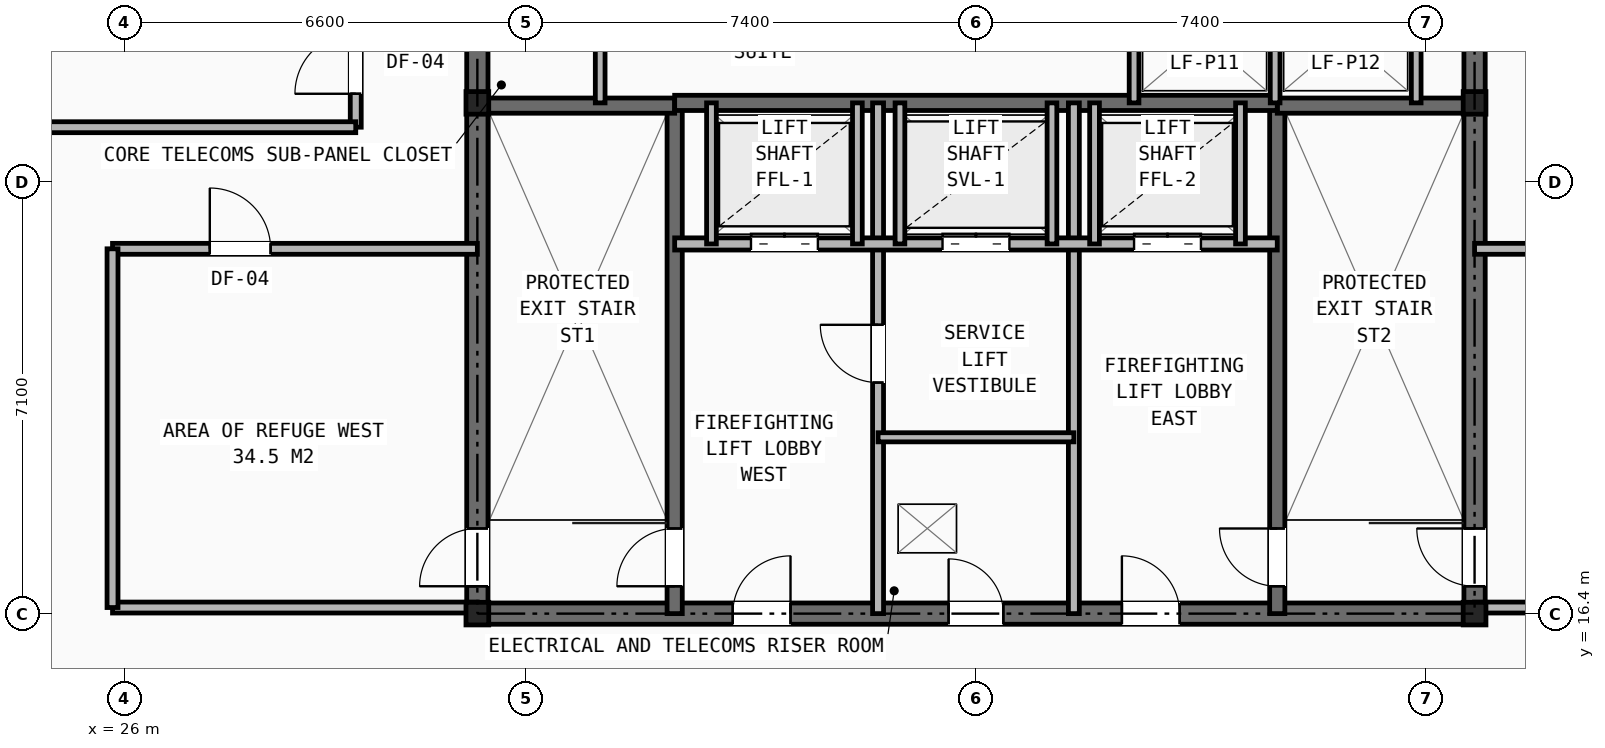
"""IFC4 building model, lengths in metres.
Left out: names, types, materials, properties, quantities, classifications, styles, units other than length and angle.
Written with IfcOpenShell. Run it as: python <this file> out.ifc"""

import sys

from ifc_helpers import new_model, si_unit, direction, frame, frame_2d, origin, origin_2d, place, context, subcontext, project, spatial, rectangle, i_section, extrude, element, fill, save


model = new_model("IFC4")
c1 = context("Model", 3, precision=1e-05, world=origin(), true_north=direction((0.0, 1.0)))
c2 = subcontext(c1, "Body", "Model", "MODEL_VIEW")
j1 = project(units=[si_unit("LENGTHUNIT", "METRE"), si_unit("PLANEANGLEUNIT", "RADIAN")], contexts=[c1])
p1 = place(None, origin())
s1 = spatial("IfcSite", under=j1, at=p1, CompositionType="ELEMENT")
p2 = place(p1, origin())
s2 = spatial("IfcBuilding", under=s1, at=p2, CompositionType="ELEMENT")
p3 = place(p2, frame((0.0, 0.0, 290.0)))
s3 = spatial("IfcBuildingStorey", under=s2, at=p3, CompositionType="ELEMENT", Elevation=290.0)
for number, where, z_axis, x_axis in (
    (1, (31.8, 16.4, 0.0), (0.0, 0.0, 1.0), (1.0, 0.0, 0.0)),
    (2, (48.2, 16.4, 0.0), (0.0, 0.0, 1.0), (1.0, 0.0, 0.0)),
    (3, (31.8, 24.8, 0.0), (0.0, 0.0, 1.0), (1.0, 0.0, 0.0)),
    (4, (48.2, 24.8, 0.0), (0.0, 0.0, 1.0), (1.0, 0.0, 0.0)),
):
    element("IfcColumn", number, at=place(p3, frame(where, z_axis=z_axis, x_axis=x_axis)), inside=s3, PredefinedType="COLUMN", context=c2, shape_type="SweptSolid", body=[
        extrude(i_section(OverallWidth=0.374, OverallDepth=0.372, WebThickness=0.016, FlangeThickness=0.026, at=origin_2d()), origin(), (0.0, 0.0, 1.0), 4.8),
    ])
p4 = place(p3, frame((31.8, 16.4, 0.0), z_axis=(0.0, 0.0, 1.0), x_axis=(1.0, 0.0, 0.0)))
e5 = element("IfcWall", 5, at=p4, inside=s3, PredefinedType="SHEAR", context=c2, shape_type="SweptSolid", body=[
    extrude(rectangle(XDim=16.4, YDim=0.35, at=frame_2d((8.2, 0.0))), origin(), (0.0, 0.0, 1.0), 4.54),
])
p5 = place(p4, frame((7.75, 0.0, 0.0)))
e6 = element("IfcOpeningElement", 6, at=p5, cuts=e5, PredefinedType="OPENING", context=c2, shape_type="SweptSolid", body=[
    extrude(rectangle(XDim=0.9, YDim=2.1, at=frame_2d((0.45, 1.05))), frame((0.0, 0.185, 0.0), z_axis=(0.0, -1.0, 0.0), x_axis=(1.0, 0.0, 0.0)), (0.0, 0.0, 1.0), 0.37),
])
p6 = place(p4, frame((4.2, 0.0, 0.0)))
e7 = element("IfcOpeningElement", 7, at=p6, cuts=e5, PredefinedType="OPENING", context=c2, shape_type="SweptSolid", body=[
    extrude(rectangle(XDim=0.95, YDim=2.1, at=frame_2d((0.475, 1.05))), frame((0.0, 0.185, 0.0), z_axis=(0.0, -1.0, 0.0), x_axis=(1.0, 0.0, 0.0)), (0.0, 0.0, 1.0), 0.37),
])
p7 = place(p4, frame((10.6, 0.0, 0.0)))
e8 = element("IfcOpeningElement", 8, at=p7, cuts=e5, PredefinedType="OPENING", context=c2, shape_type="SweptSolid", body=[
    extrude(rectangle(XDim=0.95, YDim=2.1, at=frame_2d((0.475, 1.05))), frame((0.0, 0.185, 0.0), z_axis=(0.0, -1.0, 0.0), x_axis=(1.0, 0.0, 0.0)), (0.0, 0.0, 1.0), 0.37),
])
p8 = place(p3, frame((31.8, 16.4, 0.0), z_axis=(0.0, 0.0, 1.0), x_axis=(0.0, 1.0, 0.0)))
e9 = element("IfcWall", 9, at=p8, inside=s3, PredefinedType="SHEAR", context=c2, shape_type="SweptSolid", body=[
    extrude(rectangle(XDim=14.8, YDim=0.35, at=frame_2d((7.4, 0.0))), origin(), (0.0, 0.0, 1.0), 4.54),
])
p9 = place(p8, frame((11.0, 0.0, 0.0)))
e10 = element("IfcOpeningElement", 10, at=p9, cuts=e9, PredefinedType="OPENING", context=c2, shape_type="SweptSolid", body=[
    extrude(rectangle(XDim=1.1, YDim=2.15, at=frame_2d((0.55, 1.075))), frame((0.0, 0.185, 0.0), z_axis=(0.0, -1.0, 0.0), x_axis=(1.0, 0.0, 0.0)), (0.0, 0.0, 1.0), 0.37),
])
p10 = place(p8, frame((0.45, 0.0, 0.0)))
e11 = element("IfcOpeningElement", 11, at=p10, cuts=e9, PredefinedType="OPENING", context=c2, shape_type="SweptSolid", body=[
    extrude(rectangle(XDim=0.95, YDim=2.1, at=frame_2d((0.475, 1.05))), frame((0.0, 0.185, 0.0), z_axis=(0.0, -1.0, 0.0), x_axis=(1.0, 0.0, 0.0)), (0.0, 0.0, 1.0), 0.37),
])
p11 = place(p3, frame((48.2, 16.4, 0.0), z_axis=(0.0, 0.0, 1.0), x_axis=(0.0, 1.0, 0.0)))
e12 = element("IfcWall", 12, at=p11, inside=s3, PredefinedType="SHEAR", context=c2, shape_type="SweptSolid", body=[
    extrude(rectangle(XDim=14.8, YDim=0.35, at=frame_2d((7.4, 0.0))), origin(), (0.0, 0.0, 1.0), 4.54),
])
p12 = place(p11, frame((11.0, 0.0, 0.0)))
e13 = element("IfcOpeningElement", 13, at=p12, cuts=e12, PredefinedType="OPENING", context=c2, shape_type="SweptSolid", body=[
    extrude(rectangle(XDim=1.1, YDim=2.15, at=frame_2d((0.55, 1.075))), frame((0.0, 0.185, 0.0), z_axis=(0.0, -1.0, 0.0), x_axis=(1.0, 0.0, 0.0)), (0.0, 0.0, 1.0), 0.37),
])
p13 = place(p11, frame((0.45, 0.0, 0.0)))
e14 = element("IfcOpeningElement", 14, at=p13, cuts=e12, PredefinedType="OPENING", context=c2, shape_type="SweptSolid", body=[
    extrude(rectangle(XDim=0.95, YDim=2.1, at=frame_2d((0.475, 1.05))), frame((0.0, 0.185, 0.0), z_axis=(0.0, -1.0, 0.0), x_axis=(1.0, 0.0, 0.0)), (0.0, 0.0, 1.0), 0.37),
])
p14 = place(p3, frame((35.045, 16.4, 0.0), z_axis=(0.0, 0.0, 1.0), x_axis=(0.0, 1.0, 0.0)))
e15 = element("IfcWall", 15, at=p14, inside=s3, PredefinedType="SHEAR", context=c2, shape_type="SweptSolid", body=[
    extrude(rectangle(XDim=8.4, YDim=0.25, at=frame_2d((4.2, 0.0))), origin(), (0.0, 0.0, 1.0), 4.54),
])
p15 = place(p14, frame((0.45, 0.0, 0.0)))
e16 = element("IfcOpeningElement", 16, at=p15, cuts=e15, PredefinedType="OPENING", context=c2, shape_type="SweptSolid", body=[
    extrude(rectangle(XDim=0.95, YDim=2.1, at=frame_2d((0.475, 1.05))), frame((0.0, 0.135, 0.0), z_axis=(0.0, -1.0, 0.0), x_axis=(1.0, 0.0, 0.0)), (0.0, 0.0, 1.0), 0.27),
])
p16 = place(p3, frame((31.8, 24.755, 0.0), z_axis=(0.0, 0.0, 1.0), x_axis=(1.0, 0.0, 0.0)))
e17 = element("IfcWall", 17, at=p16, inside=s3, PredefinedType="SHEAR", context=c2, shape_type="SweptSolid", body=[
    extrude(rectangle(XDim=3.245, YDim=0.25, at=frame_2d((1.623, 0.0))), origin(), (0.0, 0.0, 1.0), 4.54),
])
p17 = place(p3, frame((44.955, 16.4, 0.0), z_axis=(0.0, 0.0, 1.0), x_axis=(0.0, 1.0, 0.0)))
e18 = element("IfcWall", 18, at=p17, inside=s3, PredefinedType="SHEAR", context=c2, shape_type="SweptSolid", body=[
    extrude(rectangle(XDim=8.4, YDim=0.25, at=frame_2d((4.2, 0.0))), origin(), (0.0, 0.0, 1.0), 4.54),
])
p18 = place(p17, frame((0.45, 0.0, 0.0)))
e19 = element("IfcOpeningElement", 19, at=p18, cuts=e18, PredefinedType="OPENING", context=c2, shape_type="SweptSolid", body=[
    extrude(rectangle(XDim=0.95, YDim=2.1, at=frame_2d((0.475, 1.05))), frame((0.0, 0.135, 0.0), z_axis=(0.0, -1.0, 0.0), x_axis=(1.0, 0.0, 0.0)), (0.0, 0.0, 1.0), 0.27),
])
p19 = place(p3, frame((44.955, 24.755, 0.0), z_axis=(0.0, 0.0, 1.0), x_axis=(1.0, 0.0, 0.0)))
e20 = element("IfcWall", 20, at=p19, inside=s3, PredefinedType="SHEAR", context=c2, shape_type="SweptSolid", body=[
    extrude(rectangle(XDim=3.245, YDim=0.25, at=frame_2d((1.623, 0.0))), origin(), (0.0, 0.0, 1.0), 4.54),
])
p20 = place(p3, frame((35.045, 24.8, 0.0), z_axis=(0.0, 0.0, 1.0), x_axis=(1.0, 0.0, 0.0)))
e21 = element("IfcWall", 21, at=p20, inside=s3, PredefinedType="SHEAR", context=c2, shape_type="SweptSolid", body=[
    extrude(rectangle(XDim=9.91, YDim=0.25, at=frame_2d((4.955, 0.0))), origin(), (0.0, 0.0, 1.0), 4.54),
])
p21 = place(p3, frame((38.39, 16.4, 0.0), z_axis=(0.0, 0.0, 1.0), x_axis=(0.0, 1.0, 0.0)))
e22 = element("IfcWall", 22, at=p21, inside=s3, PredefinedType="PARTITIONING", context=c2, shape_type="SweptSolid", body=[
    extrude(rectangle(XDim=8.4, YDim=0.18, at=frame_2d((4.2, 0.0))), origin(), (0.0, 0.0, 1.0), 3.995),
])
p22 = place(p21, frame((3.8, 0.0, 0.0)))
e23 = element("IfcOpeningElement", 23, at=p22, cuts=e22, PredefinedType="OPENING", context=c2, shape_type="SweptSolid", body=[
    extrude(rectangle(XDim=0.95, YDim=2.1, at=frame_2d((0.475, 1.05))), frame((0.0, 0.1, 0.0), z_axis=(0.0, -1.0, 0.0), x_axis=(1.0, 0.0, 0.0)), (0.0, 0.0, 1.0), 0.2),
])
p23 = place(p3, frame((41.61, 16.4, 0.0), z_axis=(0.0, 0.0, 1.0), x_axis=(0.0, 1.0, 0.0)))
e24 = element("IfcWall", 24, at=p23, inside=s3, PredefinedType="PARTITIONING", context=c2, shape_type="SweptSolid", body=[
    extrude(rectangle(XDim=8.4, YDim=0.18, at=frame_2d((4.2, 0.0))), origin(), (0.0, 0.0, 1.0), 3.995),
])
p24 = place(p3, frame((35.045, 22.48, 0.0), z_axis=(0.0, 0.0, 1.0), x_axis=(1.0, 0.0, 0.0)))
e25 = element("IfcWall", 25, at=p24, inside=s3, PredefinedType="SOLIDWALL", context=c2, shape_type="SweptSolid", body=[
    extrude(rectangle(XDim=9.91, YDim=0.2, at=frame_2d((4.955, 0.0))), origin(), (0.0, 0.0, 1.0), 4.54),
])
p25 = place(p24, frame((1.255, 0.0, 0.0)))
e26 = element("IfcOpeningElement", 26, at=p25, cuts=e25, PredefinedType="OPENING", context=c2, shape_type="SweptSolid", body=[
    extrude(rectangle(XDim=1.1, YDim=2.15, at=frame_2d((0.55, 1.075))), frame((0.0, 0.11, 0.0), z_axis=(0.0, -1.0, 0.0), x_axis=(1.0, 0.0, 0.0)), (0.0, 0.0, 1.0), 0.22),
])
p26 = place(p24, frame((7.555, 0.0, 0.0)))
e27 = element("IfcOpeningElement", 27, at=p26, cuts=e25, PredefinedType="OPENING", context=c2, shape_type="SweptSolid", body=[
    extrude(rectangle(XDim=1.1, YDim=2.15, at=frame_2d((0.55, 1.075))), frame((0.0, 0.11, 0.0), z_axis=(0.0, -1.0, 0.0), x_axis=(1.0, 0.0, 0.0)), (0.0, 0.0, 1.0), 0.22),
])
p27 = place(p24, frame((4.405, 0.0, 0.0)))
e28 = element("IfcOpeningElement", 28, at=p27, cuts=e25, PredefinedType="OPENING", context=c2, shape_type="SweptSolid", body=[
    extrude(rectangle(XDim=1.1, YDim=2.15, at=frame_2d((0.55, 1.075))), frame((0.0, 0.11, 0.0), z_axis=(0.0, -1.0, 0.0), x_axis=(1.0, 0.0, 0.0)), (0.0, 0.0, 1.0), 0.22),
])
p28 = place(p3, frame((38.39, 19.3, 0.0), z_axis=(0.0, 0.0, 1.0), x_axis=(1.0, 0.0, 0.0)))
e29 = element("IfcWall", 29, at=p28, inside=s3, PredefinedType="PARTITIONING", context=c2, shape_type="SweptSolid", body=[
    extrude(rectangle(XDim=3.22, YDim=0.15, at=frame_2d((1.61, 0.0))), origin(), (0.0, 0.0, 1.0), 4.54),
])
for number, where, z_axis, x_axis in (
    (30, (35.65, 22.48, 0.0), (0.0, 0.0, 1.0), (0.0, 1.0, 0.0)),
    (31, (38.05, 22.48, 0.0), (0.0, 0.0, 1.0), (0.0, 1.0, 0.0)),
    (32, (41.95, 22.48, 0.0), (0.0, 0.0, 1.0), (0.0, 1.0, 0.0)),
    (33, (44.35, 22.48, 0.0), (0.0, 0.0, 1.0), (0.0, 1.0, 0.0)),
    (34, (38.75, 22.48, 0.0), (0.0, 0.0, 1.0), (0.0, 1.0, 0.0)),
    (35, (41.25, 22.48, 0.0), (0.0, 0.0, 1.0), (0.0, 1.0, 0.0)),
):
    element("IfcWall", number, at=place(p3, frame(where, z_axis=z_axis, x_axis=x_axis)), inside=s3, PredefinedType="SOLIDWALL", context=c2, shape_type="SweptSolid", body=[
        extrude(rectangle(XDim=2.32, YDim=0.16, at=frame_2d((1.16, 0.0))), origin(), (0.0, 0.0, 1.0), 4.54),
    ])
for number, where, z_axis, x_axis in (
    (36, (33.82, 24.8, 0.0), (0.0, 0.0, 1.0), (0.0, 1.0, 0.0)),
    (37, (42.6, 24.8, 0.0), (0.0, 0.0, 1.0), (0.0, 1.0, 0.0)),
    (38, (44.92, 24.8, 0.0), (0.0, 0.0, 1.0), (0.0, 1.0, 0.0)),
    (39, (47.24, 24.8, 0.0), (0.0, 0.0, 1.0), (0.0, 1.0, 0.0)),
):
    element("IfcWall", number, at=place(p3, frame(where, z_axis=z_axis, x_axis=x_axis)), inside=s3, PredefinedType="SOLIDWALL", context=c2, shape_type="SweptSolid", body=[
        extrude(rectangle(XDim=2.08, YDim=0.16, at=frame_2d((1.04, 0.0))), origin(), (0.0, 0.0, 1.0), 4.54),
    ])
p29 = place(p3, frame((29.8, 24.4, 0.0), z_axis=(0.0, 0.0, 1.0), x_axis=(0.0, 1.0, 0.0)))
e40 = element("IfcWall", 40, at=p29, inside=s3, PredefinedType="PARTITIONING", context=c2, shape_type="SweptSolid", body=[
    extrude(rectangle(XDim=8.6, YDim=0.18, at=frame_2d((4.3, 0.0))), origin(), (0.0, 0.0, 1.0), 3.582),
])
p30 = place(p29, frame((0.55, 0.0, 0.0)))
e41 = element("IfcOpeningElement", 41, at=p30, cuts=e40, PredefinedType="OPENING", context=c2, shape_type="SweptSolid", body=[
    extrude(rectangle(XDim=1.0, YDim=2.15, at=frame_2d((0.5, 1.075))), frame((0.0, 0.1, 0.0), z_axis=(0.0, -1.0, 0.0), x_axis=(1.0, 0.0, 0.0)), (0.0, 0.0, 1.0), 0.2),
])
p31 = place(p3, frame((25.8, 16.5, 0.0), z_axis=(0.0, 0.0, 1.0), x_axis=(1.0, 0.0, 0.0)))
e42 = element("IfcWall", 42, at=p31, inside=s3, PredefinedType="PARTITIONING", context=c2, shape_type="SweptSolid", body=[
    extrude(rectangle(XDim=6.0, YDim=0.18, at=frame_2d((3.0, 0.0))), origin(), (0.0, 0.0, 1.0), 3.582),
])
p32 = place(p3, frame((25.8, 22.4, 0.0), z_axis=(0.0, 0.0, 1.0), x_axis=(1.0, 0.0, 0.0)))
e43 = element("IfcWall", 43, at=p32, inside=s3, PredefinedType="PARTITIONING", context=c2, shape_type="SweptSolid", body=[
    extrude(rectangle(XDim=6.0, YDim=0.18, at=frame_2d((3.0, 0.0))), origin(), (0.0, 0.0, 1.0), 3.995),
])
p33 = place(p32, frame((1.6, 0.0, 0.0)))
e44 = element("IfcOpeningElement", 44, at=p33, cuts=e43, PredefinedType="OPENING", context=c2, shape_type="SweptSolid", body=[
    extrude(rectangle(XDim=1.0, YDim=2.15, at=frame_2d((0.5, 1.075))), frame((0.0, 0.1, 0.0), z_axis=(0.0, -1.0, 0.0), x_axis=(1.0, 0.0, 0.0)), (0.0, 0.0, 1.0), 0.2),
])
p34 = place(p3, frame((25.8, 16.5, 0.0), z_axis=(0.0, 0.0, 1.0), x_axis=(0.0, 1.0, 0.0)))
e45 = element("IfcWall", 45, at=p34, inside=s3, PredefinedType="PARTITIONING", context=c2, shape_type="SweptSolid", body=[
    extrude(rectangle(XDim=5.9, YDim=0.18, at=frame_2d((2.95, 0.0))), origin(), (0.0, 0.0, 1.0), 4.123),
])
p35 = place(p3, frame((48.2, 16.5, 0.0), z_axis=(0.0, 0.0, 1.0), x_axis=(1.0, 0.0, 0.0)))
e46 = element("IfcWall", 46, at=p35, inside=s3, PredefinedType="PARTITIONING", context=c2, shape_type="SweptSolid", body=[
    extrude(rectangle(XDim=6.0, YDim=0.18, at=frame_2d((3.0, 0.0))), origin(), (0.0, 0.0, 1.0), 3.995),
])
p36 = place(p3, frame((48.2, 22.4, 0.0), z_axis=(0.0, 0.0, 1.0), x_axis=(1.0, 0.0, 0.0)))
e47 = element("IfcWall", 47, at=p36, inside=s3, PredefinedType="PARTITIONING", context=c2, shape_type="SweptSolid", body=[
    extrude(rectangle(XDim=6.0, YDim=0.18, at=frame_2d((3.0, 0.0))), origin(), (0.0, 0.0, 1.0), 3.995),
])
p37 = place(p36, frame((1.6, 0.0, 0.0)))
e48 = element("IfcOpeningElement", 48, at=p37, cuts=e47, PredefinedType="OPENING", context=c2, shape_type="SweptSolid", body=[
    extrude(rectangle(XDim=1.0, YDim=2.15, at=frame_2d((0.5, 1.075))), frame((0.0, 0.1, 0.0), z_axis=(0.0, -1.0, 0.0), x_axis=(1.0, 0.0, 0.0)), (0.0, 0.0, 1.0), 0.2),
])
p38 = place(p3, frame((22.96, 24.4, 0.0), z_axis=(0.0, 0.0, 1.0), x_axis=(1.0, 0.0, 0.0)))
e49 = element("IfcWall", 49, at=p38, inside=s3, PredefinedType="PARTITIONING", context=c2, shape_type="SweptSolid", body=[
    extrude(rectangle(XDim=6.84, YDim=0.18, at=frame_2d((3.42, 0.0))), origin(), (0.0, 0.0, 1.0), 3.918),
])
p39 = place(p5, origin())
e50 = element("IfcDoor", 50, at=p39, inside=s3, OperationType="SINGLE_SWING_LEFT", PredefinedType="DOOR", context=c2, shape_type="SweptSolid", body=[
    extrude(rectangle(XDim=0.9, YDim=2.1, at=frame_2d((0.45, 1.05))), frame((0.0, 0.025, 0.0), z_axis=(0.0, -1.0, 0.0), x_axis=(1.0, 0.0, 0.0)), (0.0, 0.0, 1.0), 0.05),
])
fill(e6, e50)
p40 = place(p22, origin())
e51 = element("IfcDoor", 51, at=p40, inside=s3, OperationType="SINGLE_SWING_RIGHT", PredefinedType="DOOR", context=c2, shape_type="SweptSolid", body=[
    extrude(rectangle(XDim=0.95, YDim=2.1, at=frame_2d((0.475, 1.05))), frame((0.0, 0.025, 0.0), z_axis=(0.0, -1.0, 0.0), x_axis=(1.0, 0.0, 0.0)), (0.0, 0.0, 1.0), 0.05),
])
fill(e23, e51)
p41 = place(p15, origin())
e52 = element("IfcDoor", 52, at=p41, inside=s3, OperationType="SINGLE_SWING_LEFT", PredefinedType="DOOR", context=c2, shape_type="SweptSolid", body=[
    extrude(rectangle(XDim=0.95, YDim=2.1, at=frame_2d((0.475, 1.05))), frame((0.0, 0.025, 0.0), z_axis=(0.0, -1.0, 0.0), x_axis=(1.0, 0.0, 0.0)), (0.0, 0.0, 1.0), 0.05),
])
fill(e16, e52)
p42 = place(p18, origin())
e53 = element("IfcDoor", 53, at=p42, inside=s3, OperationType="SINGLE_SWING_RIGHT", PredefinedType="DOOR", context=c2, shape_type="SweptSolid", body=[
    extrude(rectangle(XDim=0.95, YDim=2.1, at=frame_2d((0.475, 1.05))), frame((0.0, 0.025, 0.0), z_axis=(0.0, -1.0, 0.0), x_axis=(1.0, 0.0, 0.0)), (0.0, 0.0, 1.0), 0.05),
])
fill(e19, e53)
p43 = place(p6, origin())
e54 = element("IfcDoor", 54, at=p43, inside=s3, OperationType="SINGLE_SWING_RIGHT", PredefinedType="DOOR", context=c2, shape_type="SweptSolid", body=[
    extrude(rectangle(XDim=0.95, YDim=2.1, at=frame_2d((0.475, 1.05))), frame((0.0, 0.025, 0.0), z_axis=(0.0, -1.0, 0.0), x_axis=(1.0, 0.0, 0.0)), (0.0, 0.0, 1.0), 0.05),
])
fill(e7, e54)
p44 = place(p7, origin())
e55 = element("IfcDoor", 55, at=p44, inside=s3, OperationType="SINGLE_SWING_LEFT", PredefinedType="DOOR", context=c2, shape_type="SweptSolid", body=[
    extrude(rectangle(XDim=0.95, YDim=2.1, at=frame_2d((0.475, 1.05))), frame((0.0, 0.025, 0.0), z_axis=(0.0, -1.0, 0.0), x_axis=(1.0, 0.0, 0.0)), (0.0, 0.0, 1.0), 0.05),
])
fill(e8, e55)
p45 = place(p25, origin())
e56 = element("IfcDoor", 56, at=p45, inside=s3, OperationType="DOUBLE_DOOR_SLIDING", PredefinedType="DOOR", context=c2, shape_type="SweptSolid", body=[
    extrude(rectangle(XDim=1.1, YDim=2.15, at=frame_2d((0.55, 1.075))), frame((0.0, 0.025, 0.0), z_axis=(0.0, -1.0, 0.0), x_axis=(1.0, 0.0, 0.0)), (0.0, 0.0, 1.0), 0.05),
])
fill(e26, e56)
p46 = place(p26, origin())
e57 = element("IfcDoor", 57, at=p46, inside=s3, OperationType="DOUBLE_DOOR_SLIDING", PredefinedType="DOOR", context=c2, shape_type="SweptSolid", body=[
    extrude(rectangle(XDim=1.1, YDim=2.15, at=frame_2d((0.55, 1.075))), frame((0.0, 0.025, 0.0), z_axis=(0.0, -1.0, 0.0), x_axis=(1.0, 0.0, 0.0)), (0.0, 0.0, 1.0), 0.05),
])
fill(e27, e57)
p47 = place(p27, origin())
e58 = element("IfcDoor", 58, at=p47, inside=s3, OperationType="DOUBLE_DOOR_SLIDING", PredefinedType="DOOR", context=c2, shape_type="SweptSolid", body=[
    extrude(rectangle(XDim=1.1, YDim=2.15, at=frame_2d((0.55, 1.075))), frame((0.0, 0.025, 0.0), z_axis=(0.0, -1.0, 0.0), x_axis=(1.0, 0.0, 0.0)), (0.0, 0.0, 1.0), 0.05),
])
fill(e28, e58)
p48 = place(p10, origin())
e59 = element("IfcDoor", 59, at=p48, inside=s3, OperationType="SINGLE_SWING_LEFT", PredefinedType="DOOR", context=c2, shape_type="SweptSolid", body=[
    extrude(rectangle(XDim=0.95, YDim=2.1, at=frame_2d((0.475, 1.05))), frame((0.0, 0.025, 0.0), z_axis=(0.0, -1.0, 0.0), x_axis=(1.0, 0.0, 0.0)), (0.0, 0.0, 1.0), 0.05),
])
fill(e11, e59)
p49 = place(p13, origin())
e60 = element("IfcDoor", 60, at=p49, inside=s3, OperationType="SINGLE_SWING_RIGHT", PredefinedType="DOOR", context=c2, shape_type="SweptSolid", body=[
    extrude(rectangle(XDim=0.95, YDim=2.1, at=frame_2d((0.475, 1.05))), frame((0.0, 0.025, 0.0), z_axis=(0.0, -1.0, 0.0), x_axis=(1.0, 0.0, 0.0)), (0.0, 0.0, 1.0), 0.05),
])
fill(e14, e60)
p50 = place(p33, origin())
e61 = element("IfcDoor", 61, at=p50, inside=s3, OperationType="SINGLE_SWING_LEFT", PredefinedType="DOOR", context=c2, shape_type="SweptSolid", body=[
    extrude(rectangle(XDim=1.0, YDim=2.15, at=frame_2d((0.5, 1.075))), frame((0.0, 0.025, 0.0), z_axis=(0.0, -1.0, 0.0), x_axis=(1.0, 0.0, 0.0)), (0.0, 0.0, 1.0), 0.05),
])
fill(e44, e61)
p51 = place(p30, origin())
e62 = element("IfcDoor", 62, at=p51, inside=s3, OperationType="SINGLE_SWING_LEFT", PredefinedType="DOOR", context=c2, shape_type="SweptSolid", body=[
    extrude(rectangle(XDim=1.0, YDim=2.15, at=frame_2d((0.5, 1.075))), frame((0.0, 0.025, 0.0), z_axis=(0.0, -1.0, 0.0), x_axis=(1.0, 0.0, 0.0)), (0.0, 0.0, 1.0), 0.05),
])
fill(e41, e62)
save(model, sys.argv[1])
